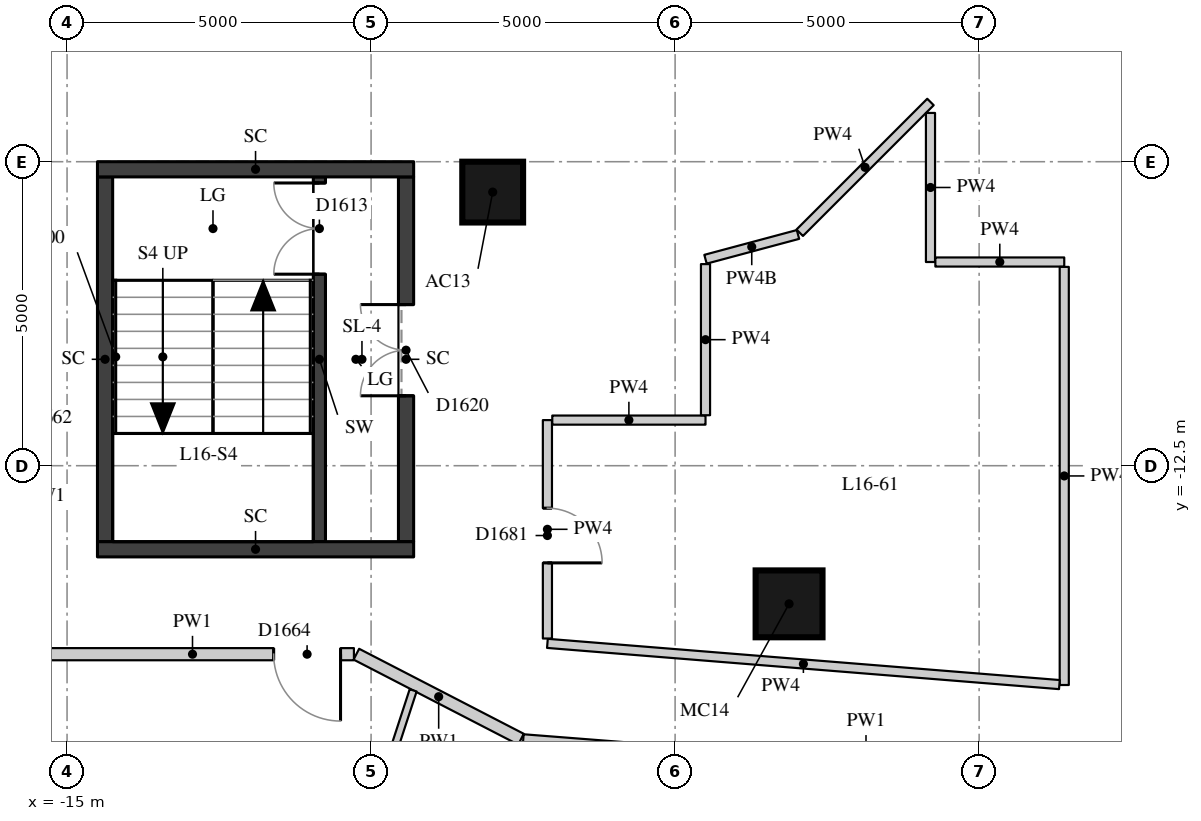
"""IFC4 building model, lengths in metres.
Left out: names, types, materials, properties, quantities, classifications, styles, units other than length and angle.
Written with IfcOpenShell. Run it as: python <this file> out.ifc"""

import sys

from ifc_helpers import new_model, si_unit, direction, frame, frame_2d, origin, origin_2d, place, context, subcontext, project, spatial, rectangle, extrude, element, fill, save


model = new_model("IFC4")
c1 = context("Model", 3, precision=1e-05, world=origin(), true_north=direction((0.0, 1.0)))
c2 = subcontext(c1, "Body", "Model", "MODEL_VIEW")
j1 = project(units=[si_unit("LENGTHUNIT", "METRE"), si_unit("PLANEANGLEUNIT", "RADIAN")], contexts=[c1])
p1 = place(None, origin())
s1 = spatial("IfcSite", under=j1, at=p1, CompositionType="ELEMENT")
p2 = place(p1, origin())
s2 = spatial("IfcBuilding", under=s1, at=p2, CompositionType="ELEMENT")
p3 = place(p2, frame((0.0, 0.0, 61.3)))
s3 = spatial("IfcBuildingStorey", under=s2, at=p3, CompositionType="ELEMENT", Elevation=61.3)
p4 = place(p3, frame((-8.0, -8.0, 0.0), z_axis=(0.0, 0.0, 1.0), x_axis=(1.0, 0.0, 0.0)))
e1 = element("IfcColumn", 1, at=p4, inside=s3, PredefinedType="COLUMN", context=c2, shape_type="SweptSolid", body=[
    extrude(rectangle(XDim=1.0, YDim=1.0, at=origin_2d()), origin(), (0.0, 0.0, 1.0), 3.3),
])
p5 = place(p3, frame((-3.126, -14.772, 0.0), z_axis=(0.0, 0.0, 1.0), x_axis=(1.0, 0.0, 0.0)))
e2 = element("IfcColumn", 2, at=p5, inside=s3, PredefinedType="COLUMN", context=c2, shape_type="SweptSolid", body=[
    extrude(rectangle(XDim=1.1, YDim=1.1, at=origin_2d()), origin(), (0.0, 0.0, 1.0), 3.3),
])
p6 = place(p3, frame((-10.85, -13.75, 0.0), z_axis=(0.0, 0.0, 1.0), x_axis=(0.0, 1.0, 0.0)))
e3 = element("IfcWall", 3, at=p6, inside=s3, PredefinedType="SHEAR", context=c2, shape_type="SweptSolid", body=[
    extrude(rectangle(XDim=6.0, YDim=0.2, at=frame_2d((3.0, 0.0))), origin(), (0.0, 0.0, 1.0), 3.02),
])
p7 = place(p6, frame((4.4, 0.0, 0.0)))
e4 = element("IfcOpeningElement", 4, at=p7, cuts=e3, PredefinedType="OPENING", context=c2, shape_type="SweptSolid", body=[
    extrude(rectangle(XDim=1.5, YDim=2.1, at=frame_2d((0.75, 1.05))), frame((0.0, 0.11, 0.0), z_axis=(0.0, -1.0, 0.0), x_axis=(1.0, 0.0, 0.0)), (0.0, 0.0, 1.0), 0.22),
])
p8 = place(p3, frame((-14.375, -13.75, -0.28), z_axis=(0.0, 0.0, 1.0), x_axis=(0.0, 1.0, 0.0)))
e5 = element("IfcWall", 5, at=p8, inside=s3, PredefinedType="SHEAR", context=c2, shape_type="SweptSolid", body=[
    extrude(rectangle(XDim=6.0, YDim=0.25, at=frame_2d((3.0, 0.0))), origin(), (0.0, 0.0, 1.0), 3.3),
])
p9 = place(p3, frame((-9.425, -13.75, -0.28), z_axis=(0.0, 0.0, 1.0), x_axis=(0.0, 1.0, 0.0)))
e6 = element("IfcWall", 6, at=p9, inside=s3, PredefinedType="SHEAR", context=c2, shape_type="SweptSolid", body=[
    extrude(rectangle(XDim=6.0, YDim=0.25, at=frame_2d((3.0, 0.0))), origin(), (0.0, 0.0, 1.0), 3.3),
])
p10 = place(p9, frame((2.4, 0.0, 0.28)))
e7 = element("IfcOpeningElement", 7, at=p10, cuts=e6, PredefinedType="OPENING", context=c2, shape_type="SweptSolid", body=[
    extrude(rectangle(XDim=1.5, YDim=2.1, at=frame_2d((0.75, 1.05))), frame((0.0, 0.135, 0.0), z_axis=(0.0, -1.0, 0.0), x_axis=(1.0, 0.0, 0.0)), (0.0, 0.0, 1.0), 0.27),
])
for number, where, z_axis, x_axis in (
    (8, (-14.5, -7.625, -0.28), (0.0, 0.0, 1.0), (1.0, 0.0, 0.0)),
    (9, (-14.5, -13.875, -0.28), (0.0, 0.0, 1.0), (1.0, 0.0, 0.0)),
):
    element("IfcWall", number, at=place(p3, frame(where, z_axis=z_axis, x_axis=x_axis)), inside=s3, PredefinedType="SHEAR", context=c2, shape_type="SweptSolid", body=[
        extrude(rectangle(XDim=5.2, YDim=0.25, at=frame_2d((2.6, 0.0))), origin(), (0.0, 0.0, 1.0), 3.3),
    ])
p11 = place(p3, frame((3.778, -17.898, 0.0), z_axis=(0.0, 0.0, 1.0), x_axis=(-0.996963005503, 0.077876605336, 0.0)))
e10 = element("IfcWall", 10, at=p11, inside=s3, PredefinedType="PARTITIONING", context=c2, shape_type="SweptSolid", body=[
    extrude(rectangle(XDim=11.311, YDim=0.2, at=frame_2d((5.656, 0.0))), origin(), (0.0, 0.0, 1.0), 3.02),
])
p12 = place(p11, frame((8.33, 0.0, 0.0)))
e11 = element("IfcOpeningElement", 11, at=p12, cuts=e10, PredefinedType="OPENING", context=c2, shape_type="SweptSolid", body=[
    extrude(rectangle(XDim=1.0, YDim=2.1, at=frame_2d((0.5, 1.05))), frame((0.0, 0.11, 0.0), z_axis=(0.0, -1.0, 0.0), x_axis=(1.0, 0.0, 0.0)), (0.0, 0.0, 1.0), 0.22),
])
p13 = place(p11, frame((5.77, 0.0, 0.0)))
e12 = element("IfcOpeningElement", 12, at=p13, cuts=e10, PredefinedType="OPENING", context=c2, shape_type="SweptSolid", body=[
    extrude(rectangle(XDim=1.0, YDim=2.1, at=frame_2d((0.5, 1.05))), frame((0.0, 0.11, 0.0), z_axis=(0.0, -1.0, 0.0), x_axis=(1.0, 0.0, 0.0)), (0.0, 0.0, 1.0), 0.22),
])
p14 = place(p11, frame((1.45, 0.0, 0.0)))
e13 = element("IfcOpeningElement", 13, at=p14, cuts=e10, PredefinedType="OPENING", context=c2, shape_type="SweptSolid", body=[
    extrude(rectangle(XDim=0.9, YDim=2.1, at=frame_2d((0.45, 1.05))), frame((0.0, 0.11, 0.0), z_axis=(0.0, -1.0, 0.0), x_axis=(1.0, 0.0, 0.0)), (0.0, 0.0, 1.0), 0.22),
])
p15 = place(p3, frame((-7.534, -16.998, 0.0), z_axis=(0.0, 0.0, 1.0), x_axis=(-0.888535328052, 0.458808206992, 0.0)))
e14 = element("IfcWall", 14, at=p15, inside=s3, PredefinedType="PARTITIONING", context=c2, shape_type="SweptSolid", body=[
    extrude(rectangle(XDim=3.047, YDim=0.2, at=frame_2d((1.524, 0.0))), origin(), (0.0, 0.0, 1.0), 3.02),
])
p16 = place(p3, frame((-10.282, -15.6, 0.0), z_axis=(0.0, 0.0, 1.0), x_axis=(-1.0, 0.0, 0.0)))
e15 = element("IfcWall", 15, at=p16, inside=s3, PredefinedType="PARTITIONING", context=c2, shape_type="SweptSolid", body=[
    extrude(rectangle(XDim=5.309, YDim=0.2, at=frame_2d((2.655, 0.0))), origin(), (0.0, 0.0, 1.0), 3.02),
])
p17 = place(p16, frame((0.22, 0.0, 0.0)))
e16 = element("IfcOpeningElement", 16, at=p17, cuts=e15, PredefinedType="OPENING", context=c2, shape_type="SweptSolid", body=[
    extrude(rectangle(XDim=1.1, YDim=2.1, at=frame_2d((0.55, 1.05))), frame((0.0, 0.11, 0.0), z_axis=(0.0, -1.0, 0.0), x_axis=(1.0, 0.0, 0.0)), (0.0, 0.0, 1.0), 0.22),
])
p18 = place(p3, frame((-4.5, -9.104, 0.0), z_axis=(0.0, 0.0, 1.0), x_axis=(0.965938363316, 0.258772251746, 0.0)))
e17 = element("IfcWall", 17, at=p18, inside=s3, PredefinedType="PARTITIONING", context=c2, shape_type="SweptSolid", body=[
    extrude(rectangle(XDim=1.575, YDim=0.15, at=frame_2d((0.787, 0.0))), origin(), (0.0, 0.0, 1.0), 2.47),
])
p19 = place(p3, frame((-2.951, -8.668, 0.0), z_axis=(0.0, 0.0, 1.0), x_axis=(0.707106781187, 0.707106781187, 0.0)))
e18 = element("IfcWall", 18, at=p19, inside=s3, PredefinedType="PARTITIONING", context=c2, shape_type="SweptSolid", body=[
    extrude(rectangle(XDim=3.042, YDim=0.15, at=frame_2d((1.521, 0.0))), origin(), (0.0, 0.0, 1.0), 3.02),
])
p20 = place(p3, frame((-0.8, -6.698, 0.0), z_axis=(0.0, 0.0, 1.0), x_axis=(0.0, -1.0, 0.0)))
e19 = element("IfcWall", 19, at=p20, inside=s3, PredefinedType="PARTITIONING", context=c2, shape_type="SweptSolid", body=[
    extrude(rectangle(XDim=2.452, YDim=0.15, at=frame_2d((1.226, 0.0))), origin(), (0.0, 0.0, 1.0), 3.02),
])
p21 = place(p3, frame((-0.72, -9.15, 0.0), z_axis=(0.0, 0.0, 1.0), x_axis=(1.0, 0.0, 0.0)))
e20 = element("IfcWall", 20, at=p21, inside=s3, PredefinedType="PARTITIONING", context=c2, shape_type="SweptSolid", body=[
    extrude(rectangle(XDim=2.12, YDim=0.15, at=frame_2d((1.06, 0.0))), origin(), (0.0, 0.0, 1.0), 3.02),
])
p22 = place(p3, frame((1.4, -9.23, 0.0), z_axis=(0.0, 0.0, 1.0), x_axis=(0.0, -1.0, 0.0)))
e21 = element("IfcWall", 21, at=p22, inside=s3, PredefinedType="PARTITIONING", context=c2, shape_type="SweptSolid", body=[
    extrude(rectangle(XDim=6.877, YDim=0.15, at=frame_2d((3.438, 0.0))), origin(), (0.0, 0.0, 1.0), 3.02),
])
p23 = place(p3, frame((1.32, -16.1, 0.0), z_axis=(0.0, 0.0, 1.0), x_axis=(-0.996773882711, 0.080260991426, 0.0)))
e22 = element("IfcWall", 22, at=p23, inside=s3, PredefinedType="PARTITIONING", context=c2, shape_type="SweptSolid", body=[
    extrude(rectangle(XDim=8.447, YDim=0.15, at=frame_2d((4.224, 0.0))), origin(), (0.0, 0.0, 1.0), 3.02),
])
p24 = place(p3, frame((-7.1, -15.342, 0.0), z_axis=(0.0, 0.0, 1.0), x_axis=(0.0, 1.0, 0.0)))
e23 = element("IfcWall", 23, at=p24, inside=s3, PredefinedType="PARTITIONING", context=c2, shape_type="SweptSolid", body=[
    extrude(rectangle(XDim=3.592, YDim=0.15, at=frame_2d((1.796, 0.0))), origin(), (0.0, 0.0, 1.0), 3.02),
])
p25 = place(p24, frame((1.244, 0.0, 0.0)))
e24 = element("IfcOpeningElement", 24, at=p25, cuts=e23, PredefinedType="OPENING", context=c2, shape_type="SweptSolid", body=[
    extrude(rectangle(XDim=0.9, YDim=2.1, at=frame_2d((0.45, 1.05))), frame((0.0, 0.085, 0.0), z_axis=(0.0, -1.0, 0.0), x_axis=(1.0, 0.0, 0.0)), (0.0, 0.0, 1.0), 0.17),
])
p26 = place(p3, frame((-7.02, -11.75, 0.0), z_axis=(0.0, 0.0, 1.0), x_axis=(1.0, 0.0, 0.0)))
e25 = element("IfcWall", 25, at=p26, inside=s3, PredefinedType="PARTITIONING", context=c2, shape_type="SweptSolid", body=[
    extrude(rectangle(XDim=2.52, YDim=0.15, at=frame_2d((1.26, 0.0))), origin(), (0.0, 0.0, 1.0), 3.02),
])
p27 = place(p3, frame((-4.5, -11.67, 0.0), z_axis=(0.0, 0.0, 1.0), x_axis=(0.0, 1.0, 0.0)))
e26 = element("IfcWall", 26, at=p27, inside=s3, PredefinedType="PARTITIONING", context=c2, shape_type="SweptSolid", body=[
    extrude(rectangle(XDim=2.486, YDim=0.15, at=frame_2d((1.243, 0.0))), origin(), (0.0, 0.0, 1.0), 3.02),
])
p28 = place(p3, frame((-9.308, -16.195, 0.0), z_axis=(0.0, 0.0, 1.0), x_axis=(-0.310170219214, -0.950681037527, 0.0)))
e27 = element("IfcWall", 27, at=p28, inside=s3, PredefinedType="PARTITIONING", context=c2, shape_type="SweptSolid", body=[
    extrude(rectangle(XDim=3.014, YDim=0.12, at=frame_2d((1.507, 0.0))), origin(), (0.0, 0.0, 1.0), 3.02),
])
p29 = place(p7, origin())
e28 = element("IfcDoor", 28, at=p29, inside=s3, OperationType="DOUBLE_DOOR_SINGLE_SWING", PredefinedType="DOOR", context=c2, shape_type="SweptSolid", body=[
    extrude(rectangle(XDim=1.5, YDim=2.1, at=frame_2d((0.75, 1.05))), frame((0.0, 0.025, 0.0), z_axis=(0.0, -1.0, 0.0), x_axis=(1.0, 0.0, 0.0)), (0.0, 0.0, 1.0), 0.05),
])
fill(e4, e28)
p30 = place(p10, origin())
e29 = element("IfcDoor", 29, at=p30, inside=s3, OperationType="DOUBLE_DOOR_SINGLE_SWING", PredefinedType="DOOR", context=c2, shape_type="SweptSolid", body=[
    extrude(rectangle(XDim=1.5, YDim=2.1, at=frame_2d((0.75, 1.05))), frame((0.0, 0.025, 0.0), z_axis=(0.0, -1.0, 0.0), x_axis=(1.0, 0.0, 0.0)), (0.0, 0.0, 1.0), 0.05),
])
fill(e7, e29)
p31 = place(p17, origin())
e30 = element("IfcDoor", 30, at=p31, inside=s3, OperationType="SINGLE_SWING_LEFT", PredefinedType="DOOR", context=c2, shape_type="SweptSolid", body=[
    extrude(rectangle(XDim=1.1, YDim=2.1, at=frame_2d((0.55, 1.05))), frame((0.0, 0.025, 0.0), z_axis=(0.0, -1.0, 0.0), x_axis=(1.0, 0.0, 0.0)), (0.0, 0.0, 1.0), 0.05),
])
fill(e16, e30)
p32 = place(p25, origin())
e31 = element("IfcDoor", 31, at=p32, inside=s3, OperationType="SINGLE_SWING_RIGHT", PredefinedType="DOOR", context=c2, shape_type="SweptSolid", body=[
    extrude(rectangle(XDim=0.9, YDim=2.1, at=frame_2d((0.45, 1.05))), frame((0.0, 0.025, 0.0), z_axis=(0.0, -1.0, 0.0), x_axis=(1.0, 0.0, 0.0)), (0.0, 0.0, 1.0), 0.05),
])
fill(e24, e31)
save(model, sys.argv[1])
